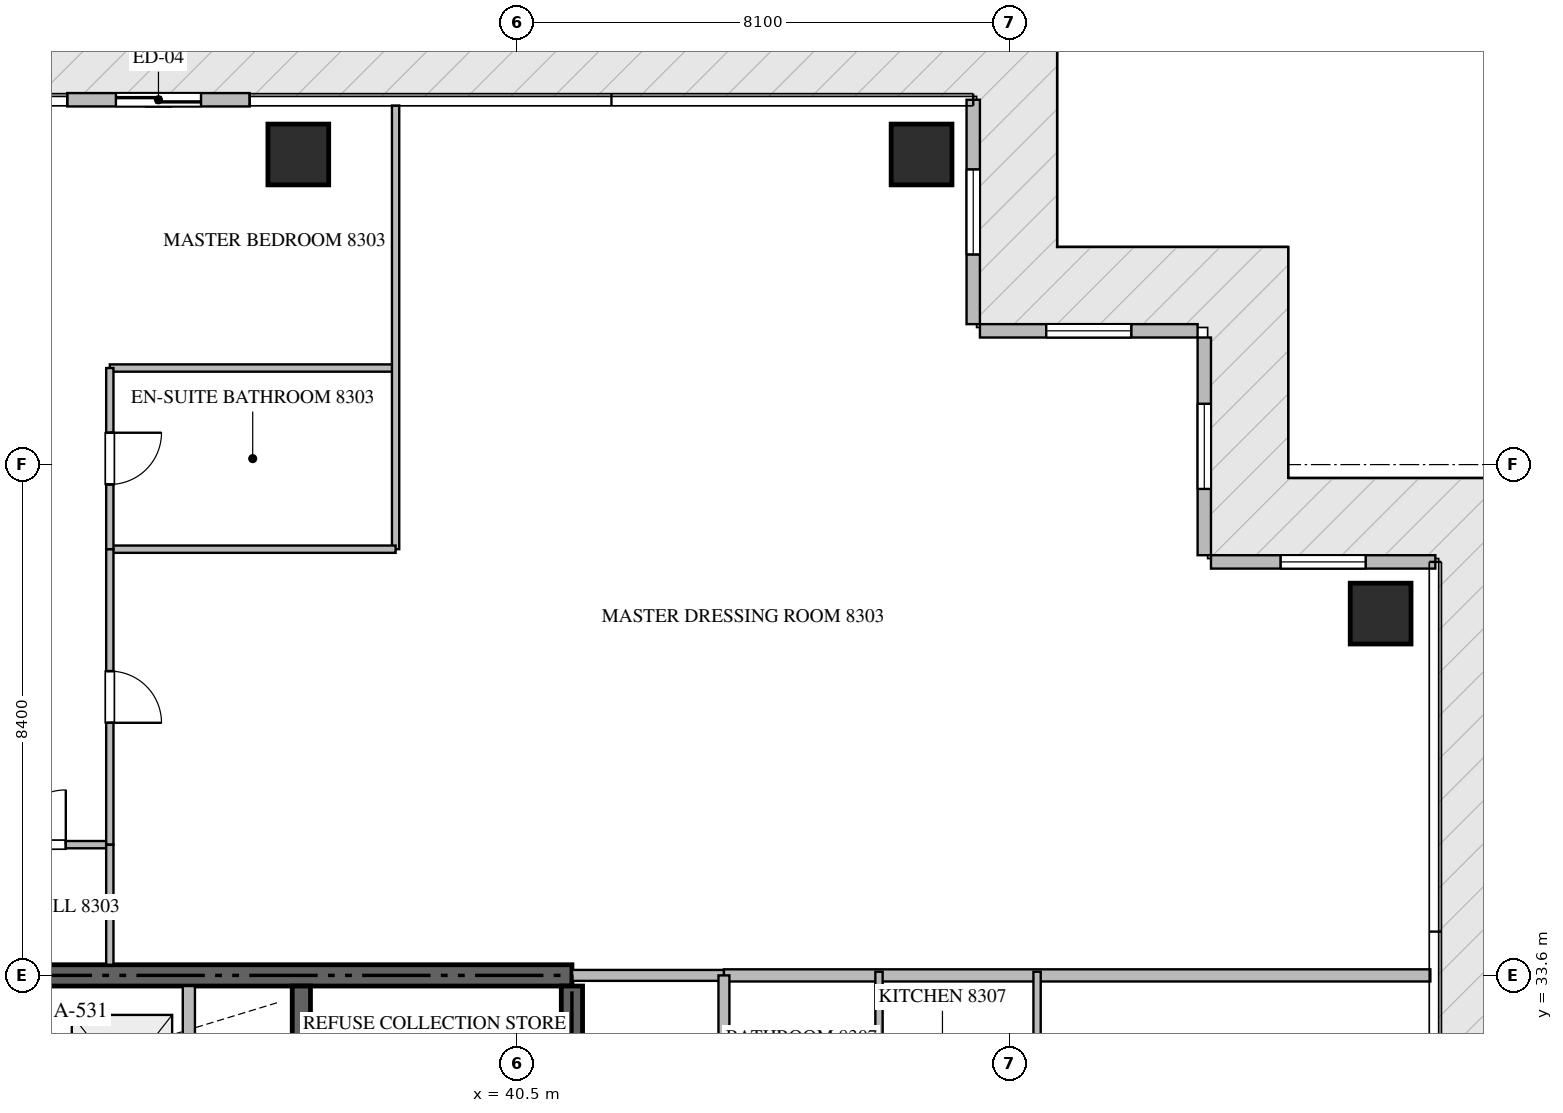
"""IFC4 building model, lengths in metres.
Left out: names, types, materials, properties, quantities, classifications, styles, units other than length and angle.
Written with IfcOpenShell. Run it as: python <this file> out.ifc"""

import sys

from ifc_helpers import new_model, si_unit, direction, frame, frame_2d, origin, origin_2d, place, context, subcontext, project, spatial, rectangle, extrude, source, transform, mapped, element, fill, save


model = new_model("IFC4")
c1 = context("Model", 3, precision=1e-05, world=origin(), true_north=direction((0.0, 1.0)))
c2 = subcontext(c1, "Body", "Model", "MODEL_VIEW")
j1 = project(units=[si_unit("LENGTHUNIT", "METRE"), si_unit("PLANEANGLEUNIT", "RADIAN")], contexts=[c1])
p1 = place(None, origin())
s1 = spatial("IfcSite", under=j1, at=p1, CompositionType="ELEMENT")
p2 = place(p1, origin())
s2 = spatial("IfcBuilding", under=s1, at=p2, CompositionType="ELEMENT")
p3 = place(p2, frame((0.0, 0.0, 333.95)))
s3 = spatial("IfcBuildingStorey", under=s2, at=p3, CompositionType="ELEMENT", Elevation=333.95)
p4 = place(p3, frame((41.4, 33.6, -0.26), z_axis=(0.0, 0.0, 1.0), x_axis=(-1.0, 0.0, 0.0)))
e1 = element("IfcWall", 1, at=p4, inside=s3, PredefinedType="SHEAR", context=c2, shape_type="SweptSolid", body=[
    extrude(rectangle(XDim=18.0, YDim=0.35, at=frame_2d((9.0, 0.0))), origin(), (0.0, 0.0, 1.0), 3.868),
])
p5 = place(p3, frame((41.4, 27.75, -0.26), z_axis=(0.0, 0.0, 1.0), x_axis=(0.0, 1.0, 0.0)))
e2 = element("IfcWall", 2, at=p5, inside=s3, PredefinedType="SHEAR", context=c2, shape_type="SweptSolid", body=[
    extrude(rectangle(XDim=5.675, YDim=0.35, at=frame_2d((2.837, 0.0))), origin(), (0.0, 0.0, 1.0), 3.868),
])
p6 = place(p3, frame((36.95, 27.05, -0.26), z_axis=(0.0, 0.0, 1.0), x_axis=(0.0, 1.0, 0.0)))
e3 = element("IfcWall", 3, at=p6, inside=s3, PredefinedType="SHEAR", context=c2, shape_type="SweptSolid", body=[
    extrude(rectangle(XDim=6.375, YDim=0.3, at=frame_2d((3.188, 0.0))), origin(), (0.0, 0.0, 1.0), 3.868),
])
m1 = source(origin(), c2, "Body", "SweptSolid", [
    extrude(rectangle(XDim=1.0, YDim=1.0, at=origin_2d()), origin(), (0.0, 0.0, 1.0), 3.87),
])
for number, where, z_axis, x_axis in (
    (4, (36.9, 47.1, -0.26), (0.0, 0.0, 1.0), (1.0, 0.0, 0.0)),
    (5, (47.15, 47.1, -0.26), (0.0, 0.0, 1.0), (1.0, 0.0, 0.0)),
    (6, (54.7, 39.55, -0.26), (0.0, 0.0, 1.0), (1.0, 0.0, 0.0)),
):
    element("IfcColumn", number, at=place(p3, frame(where, z_axis=z_axis, x_axis=x_axis)), inside=s3, PredefinedType="COLUMN", context=c2, shape_type="MappedRepresentation", body=[
        mapped(m1, transform((0.0, 0.0, 0.0), scale=1.0)),
    ])
p7 = place(p3, frame((55.6, 40.4, 0.0), z_axis=(0.0, 0.0, 1.0), x_axis=(-1.0, 0.0, 0.0)))
e7 = element("IfcWall", 7, at=p7, inside=s3, PredefinedType="ELEMENTEDWALL", context=c2, shape_type="SweptSolid", body=[
    extrude(rectangle(XDim=3.69, YDim=0.22, at=frame_2d((1.845, 0.0))), origin(), (0.0, 0.0, 1.0), 3.595),
])
p8 = place(p7, frame((1.145, 0.0, 0.65)))
e8 = element("IfcOpeningElement", 8, at=p8, cuts=e7, PredefinedType="OPENING", context=c2, shape_type="SweptSolid", body=[
    extrude(rectangle(XDim=1.4, YDim=1.35, at=frame_2d((0.7, 0.675))), frame((0.0, 0.12, 0.0), z_axis=(0.0, -1.0, 0.0), x_axis=(1.0, 0.0, 0.0)), (0.0, 0.0, 1.0), 0.24),
])
p9 = place(p3, frame((51.8, 40.51, 0.0), z_axis=(0.0, 0.0, 1.0), x_axis=(0.0, 1.0, 0.0)))
e9 = element("IfcWall", 9, at=p9, inside=s3, PredefinedType="ELEMENTEDWALL", context=c2, shape_type="SweptSolid", body=[
    extrude(rectangle(XDim=3.58, YDim=0.22, at=frame_2d((1.79, 0.0))), origin(), (0.0, 0.0, 1.0), 3.595),
])
p10 = place(p9, frame((1.09, 0.0, 0.65)))
e10 = element("IfcOpeningElement", 10, at=p10, cuts=e9, PredefinedType="OPENING", context=c2, shape_type="SweptSolid", body=[
    extrude(rectangle(XDim=1.4, YDim=1.35, at=frame_2d((0.7, 0.675))), frame((0.0, 0.12, 0.0), z_axis=(0.0, -1.0, 0.0), x_axis=(1.0, 0.0, 0.0)), (0.0, 0.0, 1.0), 0.24),
])
p11 = place(p3, frame((51.69, 44.2, 0.0), z_axis=(0.0, 0.0, 1.0), x_axis=(-1.0, 0.0, 0.0)))
e11 = element("IfcWall", 11, at=p11, inside=s3, PredefinedType="ELEMENTEDWALL", context=c2, shape_type="SweptSolid", body=[
    extrude(rectangle(XDim=3.58, YDim=0.22, at=frame_2d((1.79, 0.0))), origin(), (0.0, 0.0, 1.0), 3.595),
])
p12 = place(p11, frame((1.09, 0.0, 0.65)))
e12 = element("IfcOpeningElement", 12, at=p12, cuts=e11, PredefinedType="OPENING", context=c2, shape_type="SweptSolid", body=[
    extrude(rectangle(XDim=1.4, YDim=1.35, at=frame_2d((0.7, 0.675))), frame((0.0, 0.12, 0.0), z_axis=(0.0, -1.0, 0.0), x_axis=(1.0, 0.0, 0.0)), (0.0, 0.0, 1.0), 0.24),
])
p13 = place(p3, frame((48.0, 44.31, 0.0), z_axis=(0.0, 0.0, 1.0), x_axis=(0.0, 1.0, 0.0)))
e13 = element("IfcWall", 13, at=p13, inside=s3, PredefinedType="ELEMENTEDWALL", context=c2, shape_type="SweptSolid", body=[
    extrude(rectangle(XDim=3.69, YDim=0.22, at=frame_2d((1.845, 0.0))), origin(), (0.0, 0.0, 1.0), 3.595),
])
p14 = place(p13, frame((1.145, 0.0, 0.65)))
e14 = element("IfcOpeningElement", 14, at=p14, cuts=e13, PredefinedType="OPENING", context=c2, shape_type="SweptSolid", body=[
    extrude(rectangle(XDim=1.4, YDim=1.35, at=frame_2d((0.7, 0.675))), frame((0.0, 0.12, 0.0), z_axis=(0.0, -1.0, 0.0), x_axis=(1.0, 0.0, 0.0)), (0.0, 0.0, 1.0), 0.24),
])
p15 = place(p3, frame((36.1, 48.0, 0.0), z_axis=(0.0, 0.0, 1.0), x_axis=(-1.0, 0.0, 0.0)))
e15 = element("IfcWall", 15, at=p15, inside=s3, PredefinedType="ELEMENTEDWALL", context=c2, shape_type="SweptSolid", body=[
    extrude(rectangle(XDim=3.0, YDim=0.22, at=frame_2d((1.5, 0.0))), origin(), (0.0, 0.0, 1.0), 3.595),
])
p16 = place(p15, frame((0.8, 0.0, 0.0)))
e16 = element("IfcOpeningElement", 16, at=p16, cuts=e15, PredefinedType="OPENING", context=c2, shape_type="SweptSolid", body=[
    extrude(rectangle(XDim=1.4, YDim=2.25, at=frame_2d((0.7, 1.125))), frame((0.0, 0.12, 0.0), z_axis=(0.0, -1.0, 0.0), x_axis=(1.0, 0.0, 0.0)), (0.0, 0.0, 1.0), 0.24),
])
p17 = place(p3, frame((35.1, 30.75, 0.0), z_axis=(0.0, 0.0, 1.0), x_axis=(0.0, 1.0, 0.0)))
e17 = element("IfcWall", 17, at=p17, inside=s3, PredefinedType="STANDARD", context=c2, shape_type="SweptSolid", body=[
    extrude(rectangle(XDim=2.675, YDim=0.2, at=frame_2d((1.337, 0.0))), origin(), (0.0, 0.0, 1.0), 3.61),
])
p18 = place(p3, frame((43.9, 33.6, 0.0), z_axis=(0.0, 0.0, 1.0), x_axis=(1.0, 0.0, 0.0)))
e18 = element("IfcWall", 18, at=p18, inside=s3, PredefinedType="PARTITIONING", context=c2, shape_type="SweptSolid", body=[
    extrude(rectangle(XDim=11.618, YDim=0.2, at=frame_2d((5.809, 0.0))), origin(), (0.0, 0.0, 1.0), 3.61),
])
p19 = place(p3, frame((41.402, 33.6, 0.0), z_axis=(0.0, 0.0, 1.0), x_axis=(1.0, 0.0, 0.0)))
e19 = element("IfcWall", 19, at=p19, inside=s3, PredefinedType="PARTITIONING", context=c2, shape_type="SweptSolid", body=[
    extrude(rectangle(XDim=2.496, YDim=0.18, at=frame_2d((1.248, 0.0))), origin(), (0.0, 0.0, 1.0), 3.61),
])
p20 = place(p3, frame((43.9, 16.8, 0.0), z_axis=(0.0, 0.0, 1.0), x_axis=(0.0, 1.0, 0.0)))
e20 = element("IfcWall", 20, at=p20, inside=s3, PredefinedType="PARTITIONING", context=c2, shape_type="SweptSolid", body=[
    extrude(rectangle(XDim=16.8, YDim=0.18, at=frame_2d((8.4, 0.0))), origin(), (0.0, 0.0, 1.0), 3.61),
])
p21 = place(p20, frame((2.67, 0.0, 0.0)))
e21 = element("IfcOpeningElement", 21, at=p21, cuts=e20, PredefinedType="OPENING", context=c2, shape_type="SweptSolid", body=[
    extrude(rectangle(XDim=1.0, YDim=2.15, at=frame_2d((0.5, 1.075))), frame((0.0, 0.1, 0.0), z_axis=(0.0, -1.0, 0.0), x_axis=(1.0, 0.0, 0.0)), (0.0, 0.0, 1.0), 0.2),
])
p22 = place(p20, frame((11.107, 0.0, 0.0)))
e22 = element("IfcOpeningElement", 22, at=p22, cuts=e20, PredefinedType="OPENING", context=c2, shape_type="SweptSolid", body=[
    extrude(rectangle(XDim=1.0, YDim=2.15, at=frame_2d((0.5, 1.075))), frame((0.0, 0.1, 0.0), z_axis=(0.0, -1.0, 0.0), x_axis=(1.0, 0.0, 0.0)), (0.0, 0.0, 1.0), 0.2),
])
p23 = place(p3, frame((31.452, 35.75, 0.0), z_axis=(0.0, 0.0, 1.0), x_axis=(1.0, 0.0, 0.0)))
e23 = element("IfcWall", 23, at=p23, inside=s3, PredefinedType="PARTITIONING", context=c2, shape_type="SweptSolid", body=[
    extrude(rectangle(XDim=2.348, YDim=0.12, at=frame_2d((1.174, 0.0))), origin(), (0.0, 0.0, 1.0), 3.61),
])
p24 = place(p23, frame((0.724, 0.0, 0.0)))
e24 = element("IfcOpeningElement", 24, at=p24, cuts=e23, PredefinedType="OPENING", context=c2, shape_type="SweptSolid", body=[
    extrude(rectangle(XDim=0.9, YDim=2.1, at=frame_2d((0.45, 1.05))), frame((0.0, 0.07, 0.0), z_axis=(0.0, -1.0, 0.0), x_axis=(1.0, 0.0, 0.0)), (0.0, 0.0, 1.0), 0.14),
])
p25 = place(p3, frame((33.8, 43.588, 0.0), z_axis=(0.0, 0.0, 1.0), x_axis=(1.0, 0.0, 0.0)))
e25 = element("IfcWall", 25, at=p25, inside=s3, PredefinedType="PARTITIONING", context=c2, shape_type="SweptSolid", body=[
    extrude(rectangle(XDim=4.7, YDim=0.12, at=frame_2d((2.35, 0.0))), origin(), (0.0, 0.0, 1.0), 3.61),
])
p26 = place(p3, frame((38.5, 47.905, 0.0), z_axis=(0.0, 0.0, 1.0), x_axis=(0.0, -1.0, 0.0)))
e26 = element("IfcWall", 26, at=p26, inside=s3, PredefinedType="PARTITIONING", context=c2, shape_type="SweptSolid", body=[
    extrude(rectangle(XDim=7.296, YDim=0.12, at=frame_2d((3.648, 0.0))), origin(), (0.0, 0.0, 1.0), 3.61),
])
p27 = place(p3, frame((33.8, 40.609, 0.0), z_axis=(0.0, 0.0, 1.0), x_axis=(1.0, 0.0, 0.0)))
e27 = element("IfcWall", 27, at=p27, inside=s3, PredefinedType="PARTITIONING", context=c2, shape_type="SweptSolid", body=[
    extrude(rectangle(XDim=4.7, YDim=0.12, at=frame_2d((2.35, 0.0))), origin(), (0.0, 0.0, 1.0), 3.61),
])
p28 = place(p3, frame((33.8, 43.588, 0.0), z_axis=(0.0, 0.0, 1.0), x_axis=(0.0, -1.0, 0.0)))
e28 = element("IfcWall", 28, at=p28, inside=s3, PredefinedType="PARTITIONING", context=c2, shape_type="SweptSolid", body=[
    extrude(rectangle(XDim=2.979, YDim=0.12, at=frame_2d((1.49, 0.0))), origin(), (0.0, 0.0, 1.0), 3.61),
])
p29 = place(p28, frame((1.064, 0.0, 0.0)))
e29 = element("IfcOpeningElement", 29, at=p29, cuts=e28, PredefinedType="OPENING", context=c2, shape_type="SweptSolid", body=[
    extrude(rectangle(XDim=0.85, YDim=2.1, at=frame_2d((0.425, 1.05))), frame((0.0, 0.07, 0.0), z_axis=(0.0, -1.0, 0.0), x_axis=(1.0, 0.0, 0.0)), (0.0, 0.0, 1.0), 0.14),
])
p30 = place(p3, frame((33.8, 40.607, 0.0), z_axis=(0.0, 0.0, 1.0), x_axis=(0.0, -1.0, 0.0)))
e30 = element("IfcWall", 30, at=p30, inside=s3, PredefinedType="PARTITIONING", context=c2, shape_type="SweptSolid", body=[
    extrude(rectangle(XDim=4.857, YDim=0.12, at=frame_2d((2.428, 0.0))), origin(), (0.0, 0.0, 1.0), 3.61),
])
p31 = place(p30, frame((2.003, 0.0, 0.0)))
e31 = element("IfcOpeningElement", 31, at=p31, cuts=e30, PredefinedType="OPENING", context=c2, shape_type="SweptSolid", body=[
    extrude(rectangle(XDim=0.85, YDim=2.1, at=frame_2d((0.425, 1.05))), frame((0.0, 0.07, 0.0), z_axis=(0.0, -1.0, 0.0), x_axis=(1.0, 0.0, 0.0)), (0.0, 0.0, 1.0), 0.14),
])
p32 = place(p3, frame((33.8, 35.748, 0.0), z_axis=(0.0, 0.0, 1.0), x_axis=(0.0, -1.0, 0.0)))
e32 = element("IfcWall", 32, at=p32, inside=s3, PredefinedType="PARTITIONING", context=c2, shape_type="SweptSolid", body=[
    extrude(rectangle(XDim=1.973, YDim=0.12, at=frame_2d((0.987, 0.0))), origin(), (0.0, 0.0, 1.0), 3.61),
])
for number, where, z_axis, x_axis in (
    (33, (46.45, 31.0, 0.0), (0.0, 0.0, 1.0), (0.0, 1.0, 0.0)),
    (34, (49.05, 31.0, 0.0), (0.0, 0.0, 1.0), (0.0, 1.0, 0.0)),
):
    element("IfcWall", number, at=place(p3, frame(where, z_axis=z_axis, x_axis=x_axis)), inside=s3, PredefinedType="PARTITIONING", context=c2, shape_type="SweptSolid", body=[
        extrude(rectangle(XDim=2.66, YDim=0.12, at=frame_2d((1.33, 0.0))), origin(), (0.0, 0.0, 1.0), 3.61),
    ])
m2 = source(origin(), c2, "Body", "SweptSolid", [
    extrude(rectangle(XDim=1.4, YDim=1.35, at=frame_2d((0.7, 0.675))), frame((0.0, 0.03, 0.0), z_axis=(0.0, -1.0, 0.0), x_axis=(1.0, 0.0, 0.0)), (0.0, 0.0, 1.0), 0.06),
])
p33 = place(p8, origin())
e35 = element("IfcWindow", 35, at=p33, inside=s3, PartitioningType="SINGLE_PANEL", PredefinedType="WINDOW", context=c2, shape_type="MappedRepresentation", body=[
    mapped(m2, transform((0.0, 0.0, 0.0), scale=1.0)),
])
fill(e8, e35)
p34 = place(p10, origin())
e36 = element("IfcWindow", 36, at=p34, inside=s3, PartitioningType="SINGLE_PANEL", PredefinedType="WINDOW", context=c2, shape_type="MappedRepresentation", body=[
    mapped(m2, transform((0.0, 0.0, 0.0), scale=1.0)),
])
fill(e10, e36)
p35 = place(p12, origin())
e37 = element("IfcWindow", 37, at=p35, inside=s3, PartitioningType="SINGLE_PANEL", PredefinedType="WINDOW", context=c2, shape_type="MappedRepresentation", body=[
    mapped(m2, transform((0.0, 0.0, 0.0), scale=1.0)),
])
fill(e12, e37)
p36 = place(p14, origin())
e38 = element("IfcWindow", 38, at=p36, inside=s3, PartitioningType="SINGLE_PANEL", PredefinedType="WINDOW", context=c2, shape_type="MappedRepresentation", body=[
    mapped(m2, transform((0.0, 0.0, 0.0), scale=1.0)),
])
fill(e14, e38)
m3 = source(origin(), c2, "Body", "SweptSolid", [
    extrude(rectangle(XDim=1.4, YDim=2.25, at=frame_2d((0.7, 1.125))), frame((0.0, 0.025, 0.0), z_axis=(0.0, -1.0, 0.0), x_axis=(1.0, 0.0, 0.0)), (0.0, 0.0, 1.0), 0.05),
])
p37 = place(p16, origin())
e39 = element("IfcDoor", 39, at=p37, inside=s3, OperationType="SLIDING_TO_LEFT", PredefinedType="DOOR", context=c2, shape_type="MappedRepresentation", body=[
    mapped(m3, transform((0.0, 0.0, 0.0), scale=1.0)),
])
fill(e16, e39)
m4 = source(origin(), c2, "Body", "SweptSolid", [
    extrude(rectangle(XDim=0.9, YDim=2.1, at=frame_2d((0.45, 1.05))), frame((0.0, 0.025, 0.0), z_axis=(0.0, -1.0, 0.0), x_axis=(1.0, 0.0, 0.0)), (0.0, 0.0, 1.0), 0.05),
])
p38 = place(p24, origin())
e40 = element("IfcDoor", 40, at=p38, inside=s3, OperationType="SINGLE_SWING_RIGHT", PredefinedType="DOOR", context=c2, shape_type="MappedRepresentation", body=[
    mapped(m4, transform((0.0, 0.0, 0.0), scale=1.0)),
])
fill(e24, e40)
m5 = source(origin(), c2, "Body", "SweptSolid", [
    extrude(rectangle(XDim=0.85, YDim=2.1, at=frame_2d((0.425, 1.05))), frame((0.0, 0.025, 0.0), z_axis=(0.0, -1.0, 0.0), x_axis=(1.0, 0.0, 0.0)), (0.0, 0.0, 1.0), 0.05),
])
p39 = place(p29, origin())
e41 = element("IfcDoor", 41, at=p39, inside=s3, OperationType="SINGLE_SWING_LEFT", PredefinedType="DOOR", context=c2, shape_type="MappedRepresentation", body=[
    mapped(m5, transform((0.0, 0.0, 0.0), scale=1.0)),
])
fill(e29, e41)
p40 = place(p31, origin())
e42 = element("IfcDoor", 42, at=p40, inside=s3, OperationType="SINGLE_SWING_RIGHT", PredefinedType="DOOR", context=c2, shape_type="MappedRepresentation", body=[
    mapped(m5, transform((0.0, 0.0, 0.0), scale=1.0)),
])
fill(e31, e42)
save(model, sys.argv[1])
